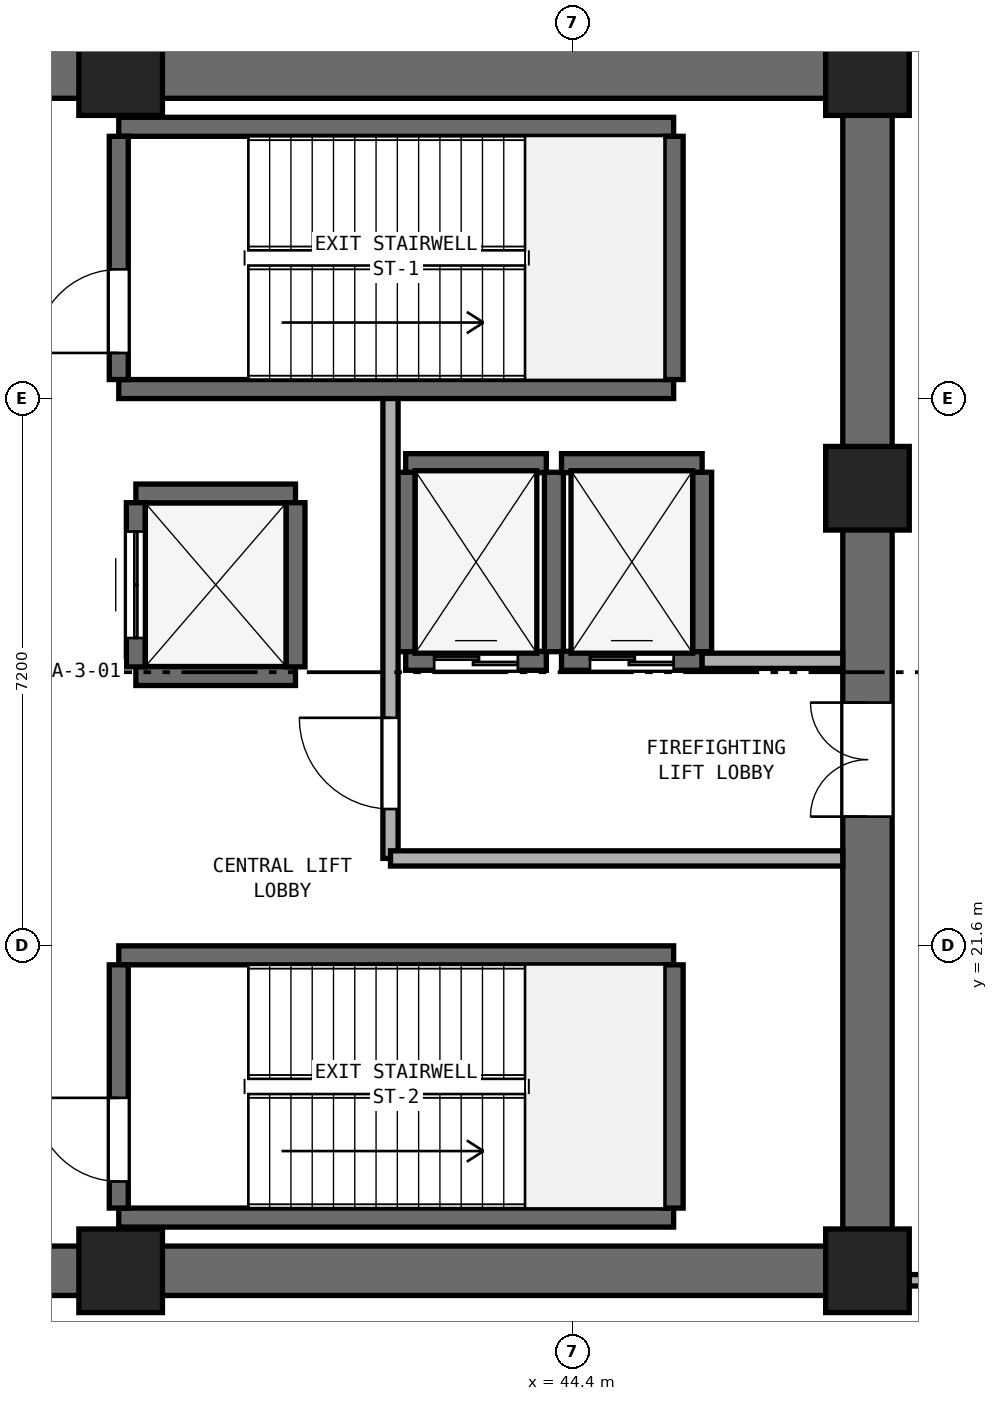
"""IFC4 building model, lengths in metres.
Left out: names, types, materials, properties, quantities, classifications, styles, units other than length and angle.
Written with IfcOpenShell. Run it as: python <this file> out.ifc"""

import sys

from ifc_helpers import new_model, si_unit, direction, frame, frame_2d, origin, origin_2d, place, context, subcontext, project, spatial, rectangle, extrude, element, fill, save


model = new_model("IFC4")
c1 = context("Model", 3, precision=1e-05, world=origin(), true_north=direction((0.0, 1.0)))
c2 = subcontext(c1, "Body", "Model", "MODEL_VIEW")
j1 = project(units=[si_unit("LENGTHUNIT", "METRE"), si_unit("PLANEANGLEUNIT", "RADIAN")], contexts=[c1])
p1 = place(None, origin())
s1 = spatial("IfcSite", under=j1, at=p1, CompositionType="ELEMENT")
p2 = place(p1, origin())
s2 = spatial("IfcBuilding", under=s1, at=p2, CompositionType="ELEMENT")
p3 = place(p2, frame((0.0, 0.0, -9.6)))
s3 = spatial("IfcBuildingStorey", under=s2, at=p3, CompositionType="ELEMENT", Elevation=-9.6)
for number, where, z_axis, x_axis in (
    (1, (25.4, 17.325, 0.0), (0.0, 0.0, 1.0), (1.0, 0.0, 0.0)),
    (2, (25.4, 33.075, 0.0), (0.0, 0.0, 1.0), (1.0, 0.0, 0.0)),
):
    element("IfcWall", number, at=place(p3, frame(where, z_axis=z_axis, x_axis=x_axis)), inside=s3, PredefinedType="SHEAR", context=c2, shape_type="SweptSolid", body=[
        extrude(rectangle(XDim=23.2, YDim=0.65, at=frame_2d((11.6, 0.0))), origin(), (0.0, 0.0, 1.0), 4.45),
    ])
p4 = place(p3, frame((48.275, 17.65, 0.0), z_axis=(0.0, 0.0, 1.0), x_axis=(0.0, 1.0, 0.0)))
e3 = element("IfcWall", 3, at=p4, inside=s3, PredefinedType="SHEAR", context=c2, shape_type="SweptSolid", body=[
    extrude(rectangle(XDim=15.1, YDim=0.65, at=frame_2d((7.55, 0.0))), origin(), (0.0, 0.0, 1.0), 4.45),
])
p5 = place(p4, frame((5.65, 0.0, 0.0)))
e4 = element("IfcOpeningElement", 4, at=p5, cuts=e3, PredefinedType="OPENING", context=c2, shape_type="SweptSolid", body=[
    extrude(rectangle(XDim=1.5, YDim=2.15, at=frame_2d((0.75, 1.075))), frame((0.0, 0.335, 0.0), z_axis=(0.0, -1.0, 0.0), x_axis=(1.0, 0.0, 0.0)), (0.0, 0.0, 1.0), 0.67),
])
for number, where, z_axis, x_axis in (
    (5, (38.45, 17.325, 0.0), (0.0, 0.0, 1.0), (1.0, 0.0, 0.0)),
    (6, (48.275, 17.325, 0.0), (0.0, 0.0, 1.0), (1.0, 0.0, 0.0)),
    (7, (48.275, 27.62, 0.0), (0.0, 0.0, 1.0), (1.0, 0.0, 0.0)),
    (8, (48.275, 33.075, 0.0), (0.0, 0.0, 1.0), (1.0, 0.0, 0.0)),
    (9, (38.45, 33.075, 0.0), (0.0, 0.0, 1.0), (1.0, 0.0, 0.0)),
):
    element("IfcColumn", number, at=place(p3, frame(where, z_axis=z_axis, x_axis=x_axis)), inside=s3, PredefinedType="PILASTER", context=c2, shape_type="SweptSolid", body=[
        extrude(rectangle(XDim=1.1, YDim=1.1, at=origin_2d()), origin(), (0.0, 0.0, 1.0), 4.8),
    ])
for number, where, z_axis, x_axis in (
    (10, (38.425, 28.925, 0.0), (0.0, 0.0, 1.0), (1.0, 0.0, 0.0)),
    (11, (38.425, 32.375, 0.0), (0.0, 0.0, 1.0), (1.0, 0.0, 0.0)),
):
    element("IfcWall", number, at=place(p3, frame(where, z_axis=z_axis, x_axis=x_axis)), inside=s3, PredefinedType="SHEAR", context=c2, shape_type="SweptSolid", body=[
        extrude(rectangle(XDim=7.3, YDim=0.25, at=frame_2d((3.65, 0.0))), origin(), (0.0, 0.0, 1.0), 4.45),
    ])
p6 = place(p3, frame((38.425, 29.05, 0.0), z_axis=(0.0, 0.0, 1.0), x_axis=(0.0, 1.0, 0.0)))
e12 = element("IfcWall", 12, at=p6, inside=s3, PredefinedType="SHEAR", context=c2, shape_type="SweptSolid", body=[
    extrude(rectangle(XDim=3.2, YDim=0.25, at=frame_2d((1.6, 0.0))), origin(), (0.0, 0.0, 1.0), 4.45),
])
p7 = place(p6, frame((0.35, 0.0, 0.0)))
e13 = element("IfcOpeningElement", 13, at=p7, cuts=e12, PredefinedType="OPENING", context=c2, shape_type="SweptSolid", body=[
    extrude(rectangle(XDim=1.1, YDim=2.15, at=frame_2d((0.55, 1.075))), frame((0.0, 0.135, 0.0), z_axis=(0.0, -1.0, 0.0), x_axis=(1.0, 0.0, 0.0)), (0.0, 0.0, 1.0), 0.27),
])
p8 = place(p3, frame((45.725, 29.05, 0.0), z_axis=(0.0, 0.0, 1.0), x_axis=(0.0, 1.0, 0.0)))
e14 = element("IfcWall", 14, at=p8, inside=s3, PredefinedType="SHEAR", context=c2, shape_type="SweptSolid", body=[
    extrude(rectangle(XDim=3.2, YDim=0.25, at=frame_2d((1.6, 0.0))), origin(), (0.0, 0.0, 1.0), 4.45),
])
for number, where, z_axis, x_axis in (
    (15, (38.425, 18.025, 0.0), (0.0, 0.0, 1.0), (1.0, 0.0, 0.0)),
    (16, (38.425, 21.475, 0.0), (0.0, 0.0, 1.0), (1.0, 0.0, 0.0)),
):
    element("IfcWall", number, at=place(p3, frame(where, z_axis=z_axis, x_axis=x_axis)), inside=s3, PredefinedType="SHEAR", context=c2, shape_type="SweptSolid", body=[
        extrude(rectangle(XDim=7.3, YDim=0.25, at=frame_2d((3.65, 0.0))), origin(), (0.0, 0.0, 1.0), 4.45),
    ])
p9 = place(p3, frame((38.425, 18.15, 0.0), z_axis=(0.0, 0.0, 1.0), x_axis=(0.0, 1.0, 0.0)))
e17 = element("IfcWall", 17, at=p9, inside=s3, PredefinedType="SHEAR", context=c2, shape_type="SweptSolid", body=[
    extrude(rectangle(XDim=3.2, YDim=0.25, at=frame_2d((1.6, 0.0))), origin(), (0.0, 0.0, 1.0), 4.45),
])
p10 = place(p9, frame((0.35, 0.0, 0.0)))
e18 = element("IfcOpeningElement", 18, at=p10, cuts=e17, PredefinedType="OPENING", context=c2, shape_type="SweptSolid", body=[
    extrude(rectangle(XDim=1.1, YDim=2.15, at=frame_2d((0.55, 1.075))), frame((0.0, 0.135, 0.0), z_axis=(0.0, -1.0, 0.0), x_axis=(1.0, 0.0, 0.0)), (0.0, 0.0, 1.0), 0.27),
])
p11 = place(p3, frame((45.725, 18.15, 0.0), z_axis=(0.0, 0.0, 1.0), x_axis=(0.0, 1.0, 0.0)))
e19 = element("IfcWall", 19, at=p11, inside=s3, PredefinedType="SHEAR", context=c2, shape_type="SweptSolid", body=[
    extrude(rectangle(XDim=3.2, YDim=0.25, at=frame_2d((1.6, 0.0))), origin(), (0.0, 0.0, 1.0), 4.45),
])
p12 = place(p3, frame((42.2, 25.35, 0.0), z_axis=(0.0, 0.0, 1.0), x_axis=(1.0, 0.0, 0.0)))
e20 = element("IfcWall", 20, at=p12, inside=s3, PredefinedType="SHEAR", context=c2, shape_type="SweptSolid", body=[
    extrude(rectangle(XDim=1.85, YDim=0.25, at=frame_2d((0.925, 0.0))), origin(), (0.0, 0.0, 1.0), 4.45),
])
p13 = place(p12, frame((0.375, 0.0, 0.0)))
e21 = element("IfcOpeningElement", 21, at=p13, cuts=e20, PredefinedType="OPENING", context=c2, shape_type="SweptSolid", body=[
    extrude(rectangle(XDim=1.1, YDim=2.15, at=frame_2d((0.55, 1.075))), frame((0.0, 0.135, 0.0), z_axis=(0.0, -1.0, 0.0), x_axis=(1.0, 0.0, 0.0)), (0.0, 0.0, 1.0), 0.27),
])
p14 = place(p3, frame((42.2, 27.95, 0.0), z_axis=(0.0, 0.0, 1.0), x_axis=(1.0, 0.0, 0.0)))
e22 = element("IfcWall", 22, at=p14, inside=s3, PredefinedType="SHEAR", context=c2, shape_type="SweptSolid", body=[
    extrude(rectangle(XDim=1.85, YDim=0.25, at=frame_2d((0.925, 0.0))), origin(), (0.0, 0.0, 1.0), 4.45),
])
for number, where, z_axis, x_axis in (
    (23, (42.2, 25.47, 0.0), (0.0, 0.0, 1.0), (0.0, 1.0, 0.0)),
    (24, (44.15, 25.47, 0.0), (0.0, 0.0, 1.0), (0.0, 1.0, 0.0)),
):
    element("IfcWall", number, at=place(p3, frame(where, z_axis=z_axis, x_axis=x_axis)), inside=s3, PredefinedType="SHEAR", context=c2, shape_type="SweptSolid", body=[
        extrude(rectangle(XDim=2.36, YDim=0.25, at=frame_2d((1.18, 0.0))), origin(), (0.0, 0.0, 1.0), 4.45),
    ])
p15 = place(p3, frame((44.25, 25.35, 0.0), z_axis=(0.0, 0.0, 1.0), x_axis=(1.0, 0.0, 0.0)))
e25 = element("IfcWall", 25, at=p15, inside=s3, PredefinedType="SHEAR", context=c2, shape_type="SweptSolid", body=[
    extrude(rectangle(XDim=1.85, YDim=0.25, at=frame_2d((0.925, 0.0))), origin(), (0.0, 0.0, 1.0), 4.45),
])
p16 = place(p15, frame((0.375, 0.0, 0.0)))
e26 = element("IfcOpeningElement", 26, at=p16, cuts=e25, PredefinedType="OPENING", context=c2, shape_type="SweptSolid", body=[
    extrude(rectangle(XDim=1.1, YDim=2.15, at=frame_2d((0.55, 1.075))), frame((0.0, 0.135, 0.0), z_axis=(0.0, -1.0, 0.0), x_axis=(1.0, 0.0, 0.0)), (0.0, 0.0, 1.0), 0.27),
])
p17 = place(p3, frame((44.25, 27.95, 0.0), z_axis=(0.0, 0.0, 1.0), x_axis=(1.0, 0.0, 0.0)))
e27 = element("IfcWall", 27, at=p17, inside=s3, PredefinedType="SHEAR", context=c2, shape_type="SweptSolid", body=[
    extrude(rectangle(XDim=1.85, YDim=0.25, at=frame_2d((0.925, 0.0))), origin(), (0.0, 0.0, 1.0), 4.45),
])
p18 = place(p3, frame((46.1, 25.47, 0.0), z_axis=(0.0, 0.0, 1.0), x_axis=(0.0, 1.0, 0.0)))
e28 = element("IfcWall", 28, at=p18, inside=s3, PredefinedType="SHEAR", context=c2, shape_type="SweptSolid", body=[
    extrude(rectangle(XDim=2.36, YDim=0.25, at=frame_2d((1.18, 0.0))), origin(), (0.0, 0.0, 1.0), 4.45),
])
for number, where, z_axis, x_axis in (
    (29, (38.65, 25.15, 0.0), (0.0, 0.0, 1.0), (1.0, 0.0, 0.0)),
    (30, (38.65, 27.55, 0.0), (0.0, 0.0, 1.0), (1.0, 0.0, 0.0)),
):
    element("IfcWall", number, at=place(p3, frame(where, z_axis=z_axis, x_axis=x_axis)), inside=s3, PredefinedType="SHEAR", context=c2, shape_type="SweptSolid", body=[
        extrude(rectangle(XDim=2.1, YDim=0.25, at=frame_2d((1.05, 0.0))), origin(), (0.0, 0.0, 1.0), 4.45),
    ])
p19 = place(p3, frame((38.65, 25.27, 0.0), z_axis=(0.0, 0.0, 1.0), x_axis=(0.0, 1.0, 0.0)))
e31 = element("IfcWall", 31, at=p19, inside=s3, PredefinedType="SHEAR", context=c2, shape_type="SweptSolid", body=[
    extrude(rectangle(XDim=2.16, YDim=0.25, at=frame_2d((1.08, 0.0))), origin(), (0.0, 0.0, 1.0), 4.45),
])
p20 = place(p19, frame((0.38, 0.0, 0.0)))
e32 = element("IfcOpeningElement", 32, at=p20, cuts=e31, PredefinedType="OPENING", context=c2, shape_type="SweptSolid", body=[
    extrude(rectangle(XDim=1.4, YDim=2.2, at=frame_2d((0.7, 1.1))), frame((0.0, 0.135, 0.0), z_axis=(0.0, -1.0, 0.0), x_axis=(1.0, 0.0, 0.0)), (0.0, 0.0, 1.0), 0.27),
])
p21 = place(p3, frame((40.75, 25.27, 0.0), z_axis=(0.0, 0.0, 1.0), x_axis=(0.0, 1.0, 0.0)))
e33 = element("IfcWall", 33, at=p21, inside=s3, PredefinedType="SHEAR", context=c2, shape_type="SweptSolid", body=[
    extrude(rectangle(XDim=2.16, YDim=0.25, at=frame_2d((1.08, 0.0))), origin(), (0.0, 0.0, 1.0), 4.45),
])
p22 = place(p3, frame((42.0, 22.75, 0.0), z_axis=(0.0, 0.0, 1.0), x_axis=(0.0, 1.0, 0.0)))
e34 = element("IfcWall", 34, at=p22, inside=s3, PredefinedType="SOLIDWALL", context=c2, shape_type="SweptSolid", body=[
    extrude(rectangle(XDim=6.05, YDim=0.2, at=frame_2d((3.025, 0.0))), origin(), (0.0, 0.0, 1.0), 4.45),
])
p23 = place(p22, frame((0.65, 0.0, 0.0)))
e35 = element("IfcOpeningElement", 35, at=p23, cuts=e34, PredefinedType="OPENING", context=c2, shape_type="SweptSolid", body=[
    extrude(rectangle(XDim=1.2, YDim=2.15, at=frame_2d((0.6, 1.075))), frame((0.0, 0.11, 0.0), z_axis=(0.0, -1.0, 0.0), x_axis=(1.0, 0.0, 0.0)), (0.0, 0.0, 1.0), 0.22),
])
p24 = place(p3, frame((42.0, 22.75, 0.0), z_axis=(0.0, 0.0, 1.0), x_axis=(1.0, 0.0, 0.0)))
e36 = element("IfcWall", 36, at=p24, inside=s3, PredefinedType="SOLIDWALL", context=c2, shape_type="SweptSolid", body=[
    extrude(rectangle(XDim=5.95, YDim=0.2, at=frame_2d((2.975, 0.0))), origin(), (0.0, 0.0, 1.0), 4.45),
])
p25 = place(p3, frame((46.1, 25.35, 0.0), z_axis=(0.0, 0.0, 1.0), x_axis=(1.0, 0.0, 0.0)))
e37 = element("IfcWall", 37, at=p25, inside=s3, PredefinedType="SOLIDWALL", context=c2, shape_type="SweptSolid", body=[
    extrude(rectangle(XDim=1.85, YDim=0.2, at=frame_2d((0.925, 0.0))), origin(), (0.0, 0.0, 1.0), 4.45),
])
p26 = place(p3, frame((48.74, 17.2, 0.0), z_axis=(0.0, 0.0, 1.0), x_axis=(1.0, 0.0, 0.0)))
e38 = element("IfcWall", 38, at=p26, inside=s3, PredefinedType="PARTITIONING", context=c2, shape_type="SweptSolid", body=[
    extrude(rectangle(XDim=2.3, YDim=0.15, at=frame_2d((1.15, 0.0))), origin(), (0.0, 0.0, 1.0), 4.45),
])
p27 = place(p7, origin())
e39 = element("IfcDoor", 39, at=p27, inside=s3, OperationType="SINGLE_SWING_LEFT", PredefinedType="DOOR", context=c2, shape_type="SweptSolid", body=[
    extrude(rectangle(XDim=1.1, YDim=2.15, at=frame_2d((0.55, 1.075))), frame((0.0, 0.025, 0.0), z_axis=(0.0, -1.0, 0.0), x_axis=(1.0, 0.0, 0.0)), (0.0, 0.0, 1.0), 0.05),
])
fill(e13, e39)
p28 = place(p10, origin())
e40 = element("IfcDoor", 40, at=p28, inside=s3, OperationType="SINGLE_SWING_RIGHT", PredefinedType="DOOR", context=c2, shape_type="SweptSolid", body=[
    extrude(rectangle(XDim=1.1, YDim=2.15, at=frame_2d((0.55, 1.075))), frame((0.0, 0.025, 0.0), z_axis=(0.0, -1.0, 0.0), x_axis=(1.0, 0.0, 0.0)), (0.0, 0.0, 1.0), 0.05),
])
fill(e18, e40)
p29 = place(p13, origin())
e41 = element("IfcDoor", 41, at=p29, inside=s3, OperationType="DOUBLE_DOOR_SLIDING", PredefinedType="DOOR", context=c2, shape_type="SweptSolid", body=[
    extrude(rectangle(XDim=1.1, YDim=2.15, at=frame_2d((0.55, 1.075))), frame((0.0, 0.025, 0.0), z_axis=(0.0, -1.0, 0.0), x_axis=(1.0, 0.0, 0.0)), (0.0, 0.0, 1.0), 0.05),
])
fill(e21, e41)
p30 = place(p16, origin())
e42 = element("IfcDoor", 42, at=p30, inside=s3, OperationType="DOUBLE_DOOR_SLIDING", PredefinedType="DOOR", context=c2, shape_type="SweptSolid", body=[
    extrude(rectangle(XDim=1.1, YDim=2.15, at=frame_2d((0.55, 1.075))), frame((0.0, 0.025, 0.0), z_axis=(0.0, -1.0, 0.0), x_axis=(1.0, 0.0, 0.0)), (0.0, 0.0, 1.0), 0.05),
])
fill(e26, e42)
p31 = place(p20, origin())
e43 = element("IfcDoor", 43, at=p31, inside=s3, OperationType="DOUBLE_DOOR_SLIDING", PredefinedType="DOOR", context=c2, shape_type="SweptSolid", body=[
    extrude(rectangle(XDim=1.4, YDim=2.2, at=frame_2d((0.7, 1.1))), frame((0.0, 0.025, 0.0), z_axis=(0.0, -1.0, 0.0), x_axis=(1.0, 0.0, 0.0)), (0.0, 0.0, 1.0), 0.05),
])
fill(e32, e43)
p32 = place(p23, origin())
e44 = element("IfcDoor", 44, at=p32, inside=s3, OperationType="SINGLE_SWING_RIGHT", PredefinedType="DOOR", context=c2, shape_type="SweptSolid", body=[
    extrude(rectangle(XDim=1.2, YDim=2.15, at=frame_2d((0.6, 1.075))), frame((0.0, 0.025, 0.0), z_axis=(0.0, -1.0, 0.0), x_axis=(1.0, 0.0, 0.0)), (0.0, 0.0, 1.0), 0.05),
])
fill(e35, e44)
p33 = place(p5, origin())
e45 = element("IfcDoor", 45, at=p33, inside=s3, OperationType="DOUBLE_DOOR_SINGLE_SWING", PredefinedType="DOOR", context=c2, shape_type="SweptSolid", body=[
    extrude(rectangle(XDim=1.5, YDim=2.15, at=frame_2d((0.75, 1.075))), frame((0.0, 0.025, 0.0), z_axis=(0.0, -1.0, 0.0), x_axis=(1.0, 0.0, 0.0)), (0.0, 0.0, 1.0), 0.05),
])
fill(e4, e45)
save(model, sys.argv[1])
